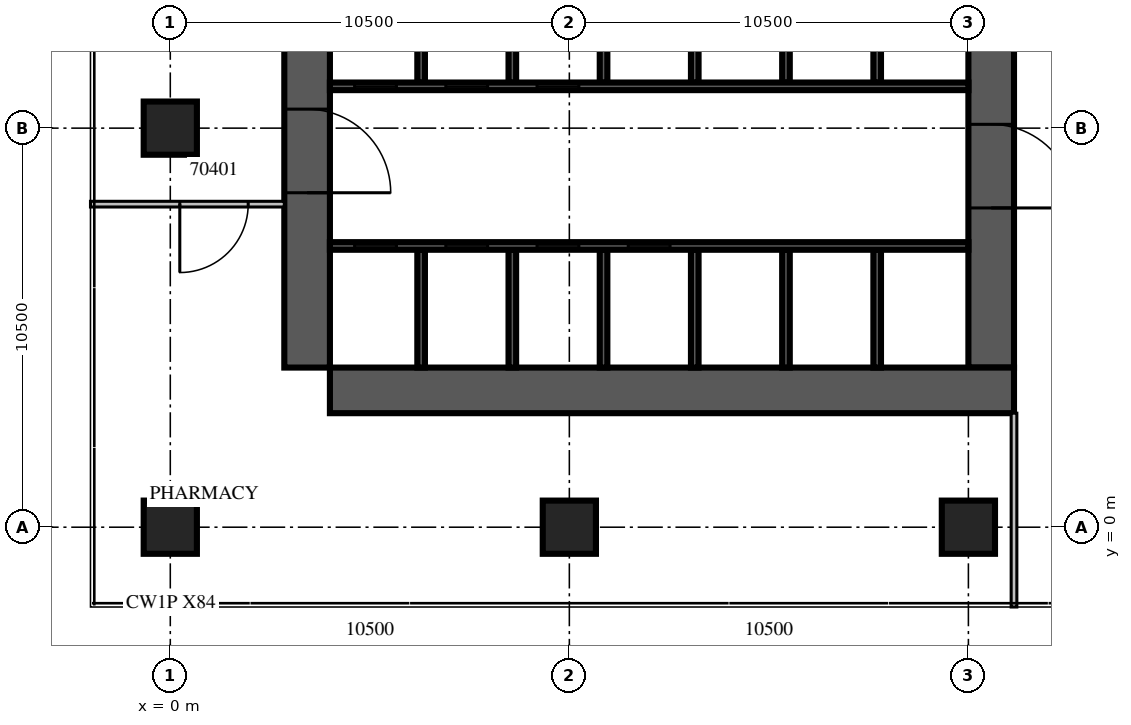
"""IFC4 building model, lengths in metres.
Left out: names, types, materials, properties, quantities, classifications, styles, units other than length and angle.
Written with IfcOpenShell. Run it as: python <this file> out.ifc"""

import sys

from ifc_helpers import new_model, si_unit, direction, frame, frame_2d, origin, origin_with_axes, origin_2d, place, context, subcontext, project, spatial, rectangle, extrude, source, transform, mapped, element, fill, save


model = new_model("IFC4")
c1 = context("Model", 3, precision=1e-05, world=origin(), true_north=direction((0.0, 1.0)))
c2 = subcontext(c1, "Body", "Model", "MODEL_VIEW")
j1 = project(units=[si_unit("LENGTHUNIT", "METRE"), si_unit("PLANEANGLEUNIT", "RADIAN")], contexts=[c1])
p1 = place(None, origin())
s1 = spatial("IfcSite", under=j1, at=p1, CompositionType="ELEMENT")
p2 = place(p1, origin())
s2 = spatial("IfcBuilding", under=s1, at=p2, CompositionType="ELEMENT")
p3 = place(p2, frame((0.0, 0.0, 7.5)))
s3 = spatial("IfcBuildingStorey", under=s2, at=p3, CompositionType="ELEMENT", Elevation=7.5)
p4 = place(p3, origin_with_axes())
e1 = element("IfcColumn", 1, at=p4, inside=s3, PredefinedType="COLUMN", context=c2, shape_type="SweptSolid", body=[
    extrude(rectangle(XDim=1.4, YDim=1.4, at=origin_2d()), origin(), (0.0, 0.0, 1.0), 5.4),
])
m1 = source(origin(), c2, "Body", "SweptSolid", [
    extrude(rectangle(XDim=1.4, YDim=1.4, at=origin_2d()), origin(), (0.0, 0.0, 1.0), 5.4),
])
for number, where, z_axis, x_axis in (
    (2, (0.0, 10.5, 0.0), (0.0, 0.0, 1.0), (1.0, 0.0, 0.0)),
    (3, (10.5, 0.0, 0.0), (0.0, 0.0, 1.0), (1.0, 0.0, 0.0)),
    (4, (21.0, 0.0, 0.0), (0.0, 0.0, 1.0), (1.0, 0.0, 0.0)),
):
    element("IfcColumn", number, at=place(p3, frame(where, z_axis=z_axis, x_axis=x_axis)), inside=s3, PredefinedType="COLUMN", context=c2, shape_type="MappedRepresentation", body=[
        mapped(m1, transform((0.0, 0.0, 0.0), scale=1.0)),
    ])
p5 = place(p3, frame((3.6, 4.2, 0.0), z_axis=(0.0, 0.0, 1.0), x_axis=(0.0, 1.0, 0.0)))
e5 = element("IfcWall", 5, at=p5, inside=s3, PredefinedType="SHEAR", context=c2, shape_type="SweptSolid", body=[
    extrude(rectangle(XDim=18.0, YDim=1.2, at=frame_2d((9.0, 0.0))), origin(), (0.0, 0.0, 1.0), 5.4),
])
m2 = source(origin(), c2, "Body", "SweptSolid", [
    extrude(rectangle(XDim=2.2, YDim=2.1, at=frame_2d((1.1, 1.05))), frame((0.0, 0.61, 0.0), z_axis=(0.0, -1.0, 0.0), x_axis=(1.0, 0.0, 0.0)), (0.0, 0.0, 1.0), 1.22),
])
p6 = place(p5, frame((4.6, 0.0, 0.0)))
e6 = element("IfcOpeningElement", 6, at=p6, cuts=e5, PredefinedType="OPENING", context=c2, shape_type="MappedRepresentation", body=[
    mapped(m2, transform((0.0, 0.0, 0.0), scale=1.0)),
])
p7 = place(p3, frame((21.6, 4.2, 0.0), z_axis=(0.0, 0.0, 1.0), x_axis=(0.0, 1.0, 0.0)))
e7 = element("IfcWall", 7, at=p7, inside=s3, PredefinedType="SHEAR", context=c2, shape_type="SweptSolid", body=[
    extrude(rectangle(XDim=16.8, YDim=1.2, at=frame_2d((8.4, 0.0))), origin(), (0.0, 0.0, 1.0), 5.4),
])
p8 = place(p7, frame((4.2, 0.0, 0.0)))
e8 = element("IfcOpeningElement", 8, at=p8, cuts=e7, PredefinedType="OPENING", context=c2, shape_type="MappedRepresentation", body=[
    mapped(m2, transform((0.0, 0.0, 0.0), scale=1.0)),
])
m3 = source(origin(), c2, "Body", "SweptSolid", [
    extrude(rectangle(XDim=1.2, YDim=2.1, at=frame_2d((0.6, 1.05))), frame((0.0, 0.61, 0.0), z_axis=(0.0, -1.0, 0.0), x_axis=(1.0, 0.0, 0.0)), (0.0, 0.0, 1.0), 1.22),
])
p9 = place(p7, frame((14.7, 0.0, 0.0)))
e9 = element("IfcOpeningElement", 9, at=p9, cuts=e7, PredefinedType="OPENING", context=c2, shape_type="MappedRepresentation", body=[
    mapped(m3, transform((0.0, 0.0, 0.0), scale=1.0)),
])
m4 = source(origin(), c2, "Body", "SweptSolid", [
    extrude(rectangle(XDim=18.0, YDim=1.2, at=frame_2d((9.0, 0.0))), origin(), (0.0, 0.0, 1.0), 5.4),
])
p10 = place(p3, frame((4.2, 3.6, 0.0), z_axis=(0.0, 0.0, 1.0), x_axis=(1.0, 0.0, 0.0)))
e10 = element("IfcWall", 10, at=p10, inside=s3, PredefinedType="SHEAR", context=c2, shape_type="MappedRepresentation", body=[
    mapped(m4, transform((0.0, 0.0, 0.0), scale=1.0)),
])
p11 = place(p3, frame((6.6, 4.2, 0.0), z_axis=(0.0, 0.0, 1.0), x_axis=(0.0, 1.0, 0.0)))
e11 = element("IfcWall", 11, at=p11, inside=s3, PredefinedType="SOLIDWALL", context=c2, shape_type="SweptSolid", body=[
    extrude(rectangle(XDim=3.1, YDim=0.2, at=frame_2d((1.55, 0.0))), origin(), (0.0, 0.0, 1.0), 5.4),
])
m5 = source(origin(), c2, "Body", "SweptSolid", [
    extrude(rectangle(XDim=3.1, YDim=0.2, at=frame_2d((1.55, 0.0))), origin(), (0.0, 0.0, 1.0), 5.4),
])
for number, where, z_axis, x_axis in (
    (12, (9.0, 4.2, 0.0), (0.0, 0.0, 1.0), (0.0, 1.0, 0.0)),
    (13, (11.4, 4.2, 0.0), (0.0, 0.0, 1.0), (0.0, 1.0, 0.0)),
    (14, (13.8, 4.2, 0.0), (0.0, 0.0, 1.0), (0.0, 1.0, 0.0)),
    (15, (16.2, 4.2, 0.0), (0.0, 0.0, 1.0), (0.0, 1.0, 0.0)),
    (16, (18.6, 4.2, 0.0), (0.0, 0.0, 1.0), (0.0, 1.0, 0.0)),
):
    element("IfcWall", number, at=place(p3, frame(where, z_axis=z_axis, x_axis=x_axis)), inside=s3, PredefinedType="SOLIDWALL", context=c2, shape_type="MappedRepresentation", body=[
        mapped(m5, transform((0.0, 0.0, 0.0), scale=1.0)),
    ])
p12 = place(p3, frame((6.6, 11.7, 0.0), z_axis=(0.0, 0.0, 1.0), x_axis=(0.0, 1.0, 0.0)))
e17 = element("IfcWall", 17, at=p12, inside=s3, PredefinedType="SOLIDWALL", context=c2, shape_type="SweptSolid", body=[
    extrude(rectangle(XDim=3.0, YDim=0.2, at=frame_2d((1.5, 0.0))), origin(), (0.0, 0.0, 1.0), 5.4),
])
m6 = source(origin(), c2, "Body", "SweptSolid", [
    extrude(rectangle(XDim=3.0, YDim=0.2, at=frame_2d((1.5, 0.0))), origin(), (0.0, 0.0, 1.0), 5.4),
])
for number, where, z_axis, x_axis in (
    (18, (9.0, 11.7, 0.0), (0.0, 0.0, 1.0), (0.0, 1.0, 0.0)),
    (19, (11.4, 11.7, 0.0), (0.0, 0.0, 1.0), (0.0, 1.0, 0.0)),
    (20, (13.8, 11.7, 0.0), (0.0, 0.0, 1.0), (0.0, 1.0, 0.0)),
    (21, (16.2, 11.7, 0.0), (0.0, 0.0, 1.0), (0.0, 1.0, 0.0)),
    (22, (18.6, 11.7, 0.0), (0.0, 0.0, 1.0), (0.0, 1.0, 0.0)),
):
    element("IfcWall", number, at=place(p3, frame(where, z_axis=z_axis, x_axis=x_axis)), inside=s3, PredefinedType="SOLIDWALL", context=c2, shape_type="MappedRepresentation", body=[
        mapped(m6, transform((0.0, 0.0, 0.0), scale=1.0)),
    ])
p13 = place(p3, frame((4.2, 7.4, 0.0), z_axis=(0.0, 0.0, 1.0), x_axis=(1.0, 0.0, 0.0)))
e23 = element("IfcWall", 23, at=p13, inside=s3, PredefinedType="SOLIDWALL", context=c2, shape_type="SweptSolid", body=[
    extrude(rectangle(XDim=16.8, YDim=0.2, at=frame_2d((8.4, 0.0))), origin(), (0.0, 0.0, 1.0), 5.4),
])
m7 = source(origin(), c2, "Body", "SweptSolid", [
    extrude(rectangle(XDim=1.1, YDim=2.1, at=frame_2d((0.55, 1.05))), frame((0.0, 0.11, 0.0), z_axis=(0.0, -1.0, 0.0), x_axis=(1.0, 0.0, 0.0)), (0.0, 0.0, 1.0), 0.22),
])
p14 = place(p13, frame((0.65, 0.0, 0.0)))
e24 = element("IfcOpeningElement", 24, at=p14, cuts=e23, PredefinedType="OPENING", context=c2, shape_type="MappedRepresentation", body=[
    mapped(m7, transform((0.0, 0.0, 0.0), scale=1.0)),
])
p15 = place(p13, frame((3.05, 0.0, 0.0)))
e25 = element("IfcOpeningElement", 25, at=p15, cuts=e23, PredefinedType="OPENING", context=c2, shape_type="MappedRepresentation", body=[
    mapped(m7, transform((0.0, 0.0, 0.0), scale=1.0)),
])
p16 = place(p13, frame((5.45, 0.0, 0.0)))
e26 = element("IfcOpeningElement", 26, at=p16, cuts=e23, PredefinedType="OPENING", context=c2, shape_type="MappedRepresentation", body=[
    mapped(m7, transform((0.0, 0.0, 0.0), scale=1.0)),
])
p17 = place(p13, frame((7.85, 0.0, 0.0)))
e27 = element("IfcOpeningElement", 27, at=p17, cuts=e23, PredefinedType="OPENING", context=c2, shape_type="MappedRepresentation", body=[
    mapped(m7, transform((0.0, 0.0, 0.0), scale=1.0)),
])
m8 = source(origin(), c2, "Body", "SweptSolid", [
    extrude(rectangle(XDim=16.8, YDim=0.2, at=frame_2d((8.4, 0.0))), origin(), (0.0, 0.0, 1.0), 5.4),
])
p18 = place(p3, frame((4.2, 11.6, 0.0), z_axis=(0.0, 0.0, 1.0), x_axis=(1.0, 0.0, 0.0)))
e28 = element("IfcWall", 28, at=p18, inside=s3, PredefinedType="SOLIDWALL", context=c2, shape_type="MappedRepresentation", body=[
    mapped(m8, transform((0.0, 0.0, 0.0), scale=1.0)),
])
p19 = place(p18, frame((0.65, 0.0, 0.0)))
e29 = element("IfcOpeningElement", 29, at=p19, cuts=e28, PredefinedType="OPENING", context=c2, shape_type="MappedRepresentation", body=[
    mapped(m7, transform((0.0, 0.0, 0.0), scale=1.0)),
])
p20 = place(p18, frame((3.05, 0.0, 0.0)))
e30 = element("IfcOpeningElement", 30, at=p20, cuts=e28, PredefinedType="OPENING", context=c2, shape_type="MappedRepresentation", body=[
    mapped(m7, transform((0.0, 0.0, 0.0), scale=1.0)),
])
p21 = place(p18, frame((5.45, 0.0, 0.0)))
e31 = element("IfcOpeningElement", 31, at=p21, cuts=e28, PredefinedType="OPENING", context=c2, shape_type="MappedRepresentation", body=[
    mapped(m7, transform((0.0, 0.0, 0.0), scale=1.0)),
])
p22 = place(p3, frame((-2.1, 8.5, 0.0), z_axis=(0.0, 0.0, 1.0), x_axis=(1.0, 0.0, 0.0)))
e32 = element("IfcWall", 32, at=p22, inside=s3, PredefinedType="PARTITIONING", context=c2, shape_type="SweptSolid", body=[
    extrude(rectangle(XDim=5.1, YDim=0.15, at=frame_2d((2.55, 0.0))), origin(), (0.0, 0.0, 1.0), 4.8),
])
m9 = source(origin(), c2, "Body", "SweptSolid", [
    extrude(rectangle(XDim=1.8, YDim=2.1, at=frame_2d((0.9, 1.05))), frame((0.0, 0.085, 0.0), z_axis=(0.0, -1.0, 0.0), x_axis=(1.0, 0.0, 0.0)), (0.0, 0.0, 1.0), 0.17),
])
p23 = place(p22, frame((2.35, 0.0, 0.0)))
e33 = element("IfcOpeningElement", 33, at=p23, cuts=e32, PredefinedType="OPENING", context=c2, shape_type="MappedRepresentation", body=[
    mapped(m9, transform((0.0, 0.0, 0.0), scale=1.0)),
])
m10 = source(origin(), c2, "Body", "SweptSolid", [
    extrude(rectangle(XDim=5.1, YDim=0.15, at=frame_2d((2.55, 0.0))), origin(), (0.0, 0.0, 1.0), 4.8),
])
p24 = place(p3, frame((22.2, -2.1, 0.0), z_axis=(0.0, 0.0, 1.0), x_axis=(0.0, 1.0, 0.0)))
e34 = element("IfcWall", 34, at=p24, inside=s3, PredefinedType="PARTITIONING", context=c2, shape_type="MappedRepresentation", body=[
    mapped(m10, transform((0.0, 0.0, 0.0), scale=1.0)),
])
m11 = source(origin(), c2, "Body", "SweptSolid", [
    extrude(rectangle(XDim=1.1, YDim=2.1, at=frame_2d((0.55, 1.05))), frame((0.0, 0.025, 0.0), z_axis=(0.0, -1.0, 0.0), x_axis=(1.0, 0.0, 0.0)), (0.0, 0.0, 1.0), 0.05),
])
p25 = place(p14, origin())
e35 = element("IfcDoor", 35, at=p25, inside=s3, OperationType="SLIDING_TO_LEFT", PredefinedType="DOOR", context=c2, shape_type="MappedRepresentation", body=[
    mapped(m11, transform((0.0, 0.0, 0.0), scale=1.0)),
])
fill(e24, e35)
p26 = place(p15, origin())
e36 = element("IfcDoor", 36, at=p26, inside=s3, OperationType="SLIDING_TO_LEFT", PredefinedType="DOOR", context=c2, shape_type="MappedRepresentation", body=[
    mapped(m11, transform((0.0, 0.0, 0.0), scale=1.0)),
])
fill(e25, e36)
p27 = place(p16, origin())
e37 = element("IfcDoor", 37, at=p27, inside=s3, OperationType="SLIDING_TO_LEFT", PredefinedType="DOOR", context=c2, shape_type="MappedRepresentation", body=[
    mapped(m11, transform((0.0, 0.0, 0.0), scale=1.0)),
])
fill(e26, e37)
p28 = place(p17, origin())
e38 = element("IfcDoor", 38, at=p28, inside=s3, OperationType="SLIDING_TO_LEFT", PredefinedType="DOOR", context=c2, shape_type="MappedRepresentation", body=[
    mapped(m11, transform((0.0, 0.0, 0.0), scale=1.0)),
])
fill(e27, e38)
p29 = place(p19, origin())
e39 = element("IfcDoor", 39, at=p29, inside=s3, OperationType="SLIDING_TO_LEFT", PredefinedType="DOOR", context=c2, shape_type="MappedRepresentation", body=[
    mapped(m11, transform((0.0, 0.0, 0.0), scale=1.0)),
])
fill(e29, e39)
p30 = place(p20, origin())
e40 = element("IfcDoor", 40, at=p30, inside=s3, OperationType="SLIDING_TO_LEFT", PredefinedType="DOOR", context=c2, shape_type="MappedRepresentation", body=[
    mapped(m11, transform((0.0, 0.0, 0.0), scale=1.0)),
])
fill(e30, e40)
p31 = place(p21, origin())
e41 = element("IfcDoor", 41, at=p31, inside=s3, OperationType="SLIDING_TO_LEFT", PredefinedType="DOOR", context=c2, shape_type="MappedRepresentation", body=[
    mapped(m11, transform((0.0, 0.0, 0.0), scale=1.0)),
])
fill(e31, e41)
m12 = source(origin(), c2, "Body", "SweptSolid", [
    extrude(rectangle(XDim=2.2, YDim=2.1, at=frame_2d((1.1, 1.05))), frame((0.0, 0.025, 0.0), z_axis=(0.0, -1.0, 0.0), x_axis=(1.0, 0.0, 0.0)), (0.0, 0.0, 1.0), 0.05),
])
p32 = place(p8, origin())
e42 = element("IfcDoor", 42, at=p32, inside=s3, OperationType="DOUBLE_DOOR_SINGLE_SWING", PredefinedType="DOOR", context=c2, shape_type="MappedRepresentation", body=[
    mapped(m12, transform((0.0, 0.0, 0.0), scale=1.0)),
])
fill(e8, e42)
p33 = place(p6, origin())
e43 = element("IfcDoor", 43, at=p33, inside=s3, OperationType="DOUBLE_DOOR_SINGLE_SWING", PredefinedType="DOOR", context=c2, shape_type="MappedRepresentation", body=[
    mapped(m12, transform((0.0, 0.0, 0.0), scale=1.0)),
])
fill(e6, e43)
m13 = source(origin(), c2, "Body", "SweptSolid", [
    extrude(rectangle(XDim=1.8, YDim=2.1, at=frame_2d((0.9, 1.05))), frame((0.0, 0.025, 0.0), z_axis=(0.0, -1.0, 0.0), x_axis=(1.0, 0.0, 0.0)), (0.0, 0.0, 1.0), 0.05),
])
p34 = place(p23, origin())
e44 = element("IfcDoor", 44, at=p34, inside=s3, OperationType="DOUBLE_DOOR_SINGLE_SWING", PredefinedType="DOOR", context=c2, shape_type="MappedRepresentation", body=[
    mapped(m13, transform((0.0, 0.0, 0.0), scale=1.0)),
])
fill(e33, e44)
save(model, sys.argv[1])
